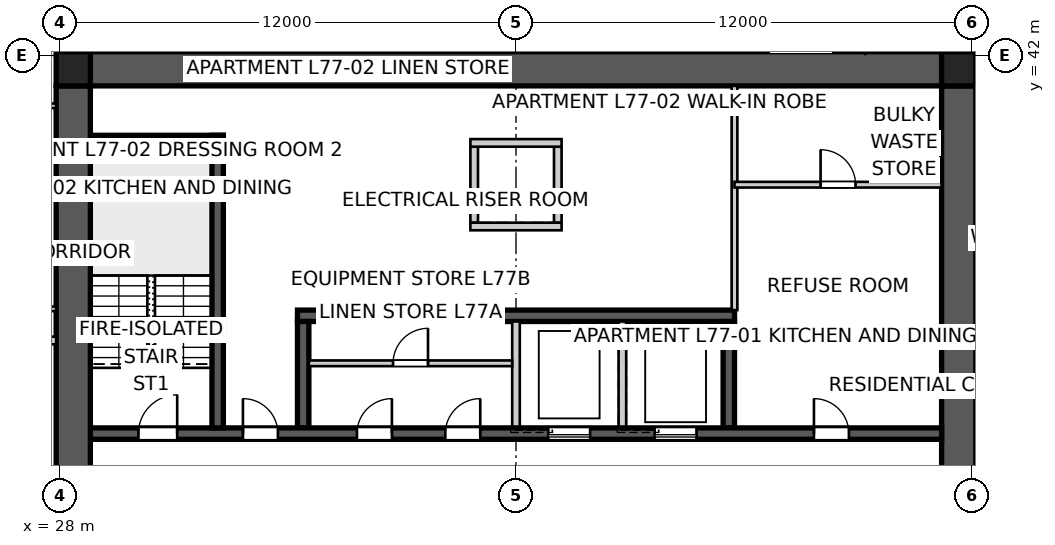
"""IFC4 building model, lengths in metres.
Left out: names, types, materials, properties, quantities, classifications, styles, units other than length and angle.
Written with IfcOpenShell. Run it as: python <this file> out.ifc"""

import sys

from ifc_helpers import new_model, si_unit, direction, frame, frame_2d, origin, origin_2d, place, context, subcontext, project, spatial, polyline, rectangle, outline, extrude, element, fill, save


model = new_model("IFC4")
c1 = context("Model", 3, precision=1e-05, world=origin(), true_north=direction((0.0, 1.0)))
c2 = subcontext(c1, "Body", "Model", "MODEL_VIEW")
j1 = project(units=[si_unit("LENGTHUNIT", "METRE"), si_unit("PLANEANGLEUNIT", "RADIAN")], contexts=[c1])
p1 = place(None, origin())
s1 = spatial("IfcSite", under=j1, at=p1, CompositionType="ELEMENT")
p2 = place(p1, origin())
s2 = spatial("IfcBuilding", under=s1, at=p2, CompositionType="ELEMENT")
p3 = place(p2, frame((0.0, 0.0, 279.4)))
s3 = spatial("IfcBuildingStorey", under=s2, at=p3, CompositionType="ELEMENT", Elevation=279.4)
p4 = place(p3, frame((28.8, 41.65, 0.0), z_axis=(0.0, 0.0, 1.0), x_axis=(1.0, 0.0, 0.0)))
e1 = element("IfcWall", 1, at=p4, inside=s3, PredefinedType="SHEAR", context=c2, shape_type="SweptSolid", body=[
    extrude(outline(polyline([(0.0, -0.45), (22.4, -0.45), (22.4, -0.025), (22.85, -0.025), (22.85, 0.025), (22.4, 0.025), (22.4, 0.45), (0.0, 0.45), (0.0, 0.025), (-0.45, 0.025), (-0.45, -0.025), (0.0, -0.025), (0.0, -0.45)])), origin(), (0.0, 0.0, 1.0), 3.4),
])
p5 = place(p3, frame((51.65, 18.8, 0.0), z_axis=(0.0, 0.0, 1.0), x_axis=(0.0, 1.0, 0.0)))
e2 = element("IfcWall", 2, at=p5, inside=s3, PredefinedType="SHEAR", context=c2, shape_type="SweptSolid", body=[
    extrude(outline(polyline([(0.0, -0.45), (22.4, -0.45), (22.4, -0.025), (22.85, -0.025), (22.85, 0.025), (22.4, 0.025), (22.4, 0.45), (0.0, 0.45), (0.0, 0.025), (-0.45, 0.025), (-0.45, -0.025), (0.0, -0.025), (0.0, -0.45)])), origin(), (0.0, 0.0, 1.0), 3.4),
])
p6 = place(p5, frame((11.14, 0.0, 0.0)))
e3 = element("IfcOpeningElement", 3, at=p6, cuts=e2, PredefinedType="OPENING", context=c2, shape_type="SweptSolid", body=[
    extrude(rectangle(XDim=1.02, YDim=2.4, at=frame_2d((0.51, 1.2))), frame((0.0, 0.46, 0.0), z_axis=(0.0, -1.0, 0.0), x_axis=(1.0, 0.0, 0.0)), (0.0, 0.0, 1.0), 0.92),
])
p7 = place(p3, frame((28.35, 41.2, 0.0), z_axis=(0.0, 0.0, 1.0), x_axis=(0.0, -1.0, 0.0)))
e4 = element("IfcWall", 4, at=p7, inside=s3, PredefinedType="SHEAR", context=c2, shape_type="SweptSolid", body=[
    extrude(outline(polyline([(0.0, -0.45), (22.4, -0.45), (22.4, -0.025), (22.85, -0.025), (22.85, 0.025), (22.4, 0.025), (22.4, 0.45), (0.0, 0.45), (0.0, 0.025), (-0.45, 0.025), (-0.45, -0.025), (0.0, -0.025), (0.0, -0.45)])), origin(), (0.0, 0.0, 1.0), 3.4),
])
p8 = place(p7, frame((11.14, 0.0, 0.0)))
e5 = element("IfcOpeningElement", 5, at=p8, cuts=e4, PredefinedType="OPENING", context=c2, shape_type="SweptSolid", body=[
    extrude(rectangle(XDim=1.02, YDim=2.4, at=frame_2d((0.51, 1.2))), frame((0.0, 0.46, 0.0), z_axis=(0.0, -1.0, 0.0), x_axis=(1.0, 0.0, 0.0)), (0.0, 0.0, 1.0), 0.92),
])
p9 = place(p3, frame((28.8, 32.05, 0.0), z_axis=(0.0, 0.0, 1.0), x_axis=(1.0, 0.0, 0.0)))
e6 = element("IfcWall", 6, at=p9, inside=s3, PredefinedType="SHEAR", context=c2, shape_type="SweptSolid", body=[
    extrude(rectangle(XDim=22.4, YDim=0.3, at=frame_2d((11.2, 0.0))), origin(), (0.0, 0.0, 1.0), 3.4),
])
p10 = place(p9, frame((19.04, 0.0, 0.0)))
e7 = element("IfcOpeningElement", 7, at=p10, cuts=e6, PredefinedType="OPENING", context=c2, shape_type="SweptSolid", body=[
    extrude(rectangle(XDim=0.92, YDim=2.1, at=frame_2d((0.46, 1.05))), frame((0.0, 0.16, 0.0), z_axis=(0.0, -1.0, 0.0), x_axis=(1.0, 0.0, 0.0)), (0.0, 0.0, 1.0), 0.32),
])
p11 = place(p9, frame((1.265, 0.0, 0.0)))
e8 = element("IfcOpeningElement", 8, at=p11, cuts=e6, PredefinedType="OPENING", context=c2, shape_type="SweptSolid", body=[
    extrude(rectangle(XDim=1.02, YDim=2.1, at=frame_2d((0.51, 1.05))), frame((0.0, 0.16, 0.0), z_axis=(0.0, -1.0, 0.0), x_axis=(1.0, 0.0, 0.0)), (0.0, 0.0, 1.0), 0.32),
])
p12 = place(p9, frame((4.015, 0.0, 0.0)))
e9 = element("IfcOpeningElement", 9, at=p12, cuts=e6, PredefinedType="OPENING", context=c2, shape_type="SweptSolid", body=[
    extrude(rectangle(XDim=0.92, YDim=2.1, at=frame_2d((0.46, 1.05))), frame((0.0, 0.16, 0.0), z_axis=(0.0, -1.0, 0.0), x_axis=(1.0, 0.0, 0.0)), (0.0, 0.0, 1.0), 0.32),
])
p13 = place(p9, frame((7.015, 0.0, 0.0)))
e10 = element("IfcOpeningElement", 10, at=p13, cuts=e6, PredefinedType="OPENING", context=c2, shape_type="SweptSolid", body=[
    extrude(rectangle(XDim=0.92, YDim=2.1, at=frame_2d((0.46, 1.05))), frame((0.0, 0.16, 0.0), z_axis=(0.0, -1.0, 0.0), x_axis=(1.0, 0.0, 0.0)), (0.0, 0.0, 1.0), 0.32),
])
p14 = place(p9, frame((9.34, 0.0, 0.0)))
e11 = element("IfcOpeningElement", 11, at=p14, cuts=e6, PredefinedType="OPENING", context=c2, shape_type="SweptSolid", body=[
    extrude(rectangle(XDim=0.92, YDim=2.1, at=frame_2d((0.46, 1.05))), frame((0.0, 0.16, 0.0), z_axis=(0.0, -1.0, 0.0), x_axis=(1.0, 0.0, 0.0)), (0.0, 0.0, 1.0), 0.32),
])
p15 = place(p9, frame((12.05, 0.0, 0.0)))
e12 = element("IfcOpeningElement", 12, at=p15, cuts=e6, PredefinedType="OPENING", context=c2, shape_type="SweptSolid", body=[
    extrude(rectangle(XDim=1.1, YDim=2.1, at=frame_2d((0.55, 1.05))), frame((0.0, 0.16, 0.0), z_axis=(0.0, -1.0, 0.0), x_axis=(1.0, 0.0, 0.0)), (0.0, 0.0, 1.0), 0.32),
])
p16 = place(p9, frame((14.85, 0.0, 0.0)))
e13 = element("IfcOpeningElement", 13, at=p16, cuts=e6, PredefinedType="OPENING", context=c2, shape_type="SweptSolid", body=[
    extrude(rectangle(XDim=1.1, YDim=2.1, at=frame_2d((0.55, 1.05))), frame((0.0, 0.16, 0.0), z_axis=(0.0, -1.0, 0.0), x_axis=(1.0, 0.0, 0.0)), (0.0, 0.0, 1.0), 0.32),
])
p17 = place(p3, frame((34.25, 35.15, 0.0), z_axis=(0.0, 0.0, 1.0), x_axis=(1.0, 0.0, 0.0)))
e14 = element("IfcWall", 14, at=p17, inside=s3, PredefinedType="SHEAR", context=c2, shape_type="SweptSolid", body=[
    extrude(rectangle(XDim=11.5, YDim=0.3, at=frame_2d((5.75, 0.0))), origin(), (0.0, 0.0, 1.0), 3.4),
])
p18 = place(p3, frame((34.4, 32.2, 0.0), z_axis=(0.0, 0.0, 1.0), x_axis=(0.0, 1.0, 0.0)))
e15 = element("IfcWall", 15, at=p18, inside=s3, PredefinedType="SHEAR", context=c2, shape_type="SweptSolid", body=[
    extrude(rectangle(XDim=2.8, YDim=0.3, at=frame_2d((1.4, 0.0))), origin(), (0.0, 0.0, 1.0), 3.4),
])
for number, where, z_axis, x_axis in (
    (16, (40.0, 32.2, 0.0), (0.0, 0.0, 1.0), (0.0, 1.0, 0.0)),
    (17, (42.8, 32.2, 0.0), (0.0, 0.0, 1.0), (0.0, 1.0, 0.0)),
):
    element("IfcWall", number, at=place(p3, frame(where, z_axis=z_axis, x_axis=x_axis)), inside=s3, PredefinedType="SOLIDWALL", context=c2, shape_type="SweptSolid", body=[
        extrude(rectangle(XDim=2.8, YDim=0.2, at=frame_2d((1.4, 0.0))), origin(), (0.0, 0.0, 1.0), 3.4),
    ])
p19 = place(p3, frame((45.6, 32.2, 0.0), z_axis=(0.0, 0.0, 1.0), x_axis=(0.0, 1.0, 0.0)))
e18 = element("IfcWall", 18, at=p19, inside=s3, PredefinedType="SHEAR", context=c2, shape_type="SweptSolid", body=[
    extrude(rectangle(XDim=2.8, YDim=0.3, at=frame_2d((1.4, 0.0))), origin(), (0.0, 0.0, 1.0), 3.4),
])
p20 = place(p3, frame((32.15, 32.2, 0.0), z_axis=(0.0, 0.0, 1.0), x_axis=(0.0, 1.0, 0.0)))
e19 = element("IfcWall", 19, at=p20, inside=s3, PredefinedType="SHEAR", context=c2, shape_type="SweptSolid", body=[
    extrude(rectangle(XDim=7.7, YDim=0.3, at=frame_2d((3.85, 0.0))), origin(), (0.0, 0.0, 1.0), 3.4),
])
p21 = place(p3, frame((28.8, 39.75, 0.0), z_axis=(0.0, 0.0, 1.0), x_axis=(1.0, 0.0, 0.0)))
e20 = element("IfcWall", 20, at=p21, inside=s3, PredefinedType="SHEAR", context=c2, shape_type="SweptSolid", body=[
    extrude(rectangle(XDim=3.5, YDim=0.3, at=frame_2d((1.75, 0.0))), origin(), (0.0, 0.0, 1.0), 3.4),
])
for number, where, z_axis, x_axis in (
    (21, (38.9, 37.6, 0.0), (0.0, 0.0, 1.0), (0.0, 1.0, 0.0)),
    (22, (41.1, 37.6, 0.0), (0.0, 0.0, 1.0), (0.0, 1.0, 0.0)),
):
    element("IfcWall", number, at=place(p3, frame(where, z_axis=z_axis, x_axis=x_axis)), inside=s3, PredefinedType="SOLIDWALL", context=c2, shape_type="SweptSolid", body=[
        extrude(rectangle(XDim=2.0, YDim=0.2, at=frame_2d((1.0, 0.0))), origin(), (0.0, 0.0, 1.0), 3.4),
    ])
for number, where, z_axis, x_axis in (
    (23, (38.8, 37.5, 0.0), (0.0, 0.0, 1.0), (1.0, 0.0, 0.0)),
    (24, (38.8, 39.7, 0.0), (0.0, 0.0, 1.0), (1.0, 0.0, 0.0)),
):
    element("IfcWall", number, at=place(p3, frame(where, z_axis=z_axis, x_axis=x_axis)), inside=s3, PredefinedType="SOLIDWALL", context=c2, shape_type="SweptSolid", body=[
        extrude(rectangle(XDim=2.4, YDim=0.2, at=frame_2d((1.2, 0.0))), origin(), (0.0, 0.0, 1.0), 3.4),
    ])
for number, where, z_axis, x_axis in (
    (25, (51.65, 41.65, 0.0), (0.0, 0.0, 1.0), (1.0, 0.0, 0.0)),
    (26, (28.35, 41.65, 0.0), (0.0, 0.0, 1.0), (1.0, 0.0, 0.0)),
):
    element("IfcColumn", number, at=place(p3, frame(where, z_axis=z_axis, x_axis=x_axis)), inside=s3, PredefinedType="COLUMN", context=c2, shape_type="SweptSolid", body=[
        extrude(rectangle(XDim=0.9, YDim=0.9, at=origin_2d()), origin(), (0.0, 0.0, 1.0), 3.4),
    ])
p22 = place(p3, frame((27.9, 34.5, 0.0), z_axis=(0.0, 0.0, 1.0), x_axis=(-1.0, 0.0, 0.0)))
e27 = element("IfcWall", 27, at=p22, inside=s3, PredefinedType="PARTITIONING", context=c2, shape_type="SweptSolid", body=[
    extrude(rectangle(XDim=2.5, YDim=0.2, at=frame_2d((1.25, 0.0))), origin(), (0.0, 0.0, 1.0), 3.25),
])
p23 = place(p3, frame((55.704, 43.177, 0.0), z_axis=(0.0, 0.0, 1.0), x_axis=(-0.76603440109, -0.64279957712, 0.0)))
e28 = element("IfcWall", 28, at=p23, inside=s3, PredefinedType="PARTITIONING", context=c2, shape_type="SweptSolid", body=[
    extrude(rectangle(XDim=4.64, YDim=0.25, at=frame_2d((2.32, 0.0))), origin(), (0.0, 0.0, 1.0), 3.25),
])
p24 = place(p3, frame((45.75, 41.2, 0.0), z_axis=(0.0, 0.0, 1.0), x_axis=(0.0, -1.0, 0.0)))
e29 = element("IfcWall", 29, at=p24, inside=s3, PredefinedType="SOLIDWALL", context=c2, shape_type="SweptSolid", body=[
    extrude(rectangle(XDim=5.9, YDim=0.15, at=frame_2d((2.95, 0.0))), origin(), (0.0, 0.0, 1.0), 3.25),
])
p25 = place(p3, frame((45.75, 38.6, 0.0), z_axis=(0.0, 0.0, 1.0), x_axis=(1.0, 0.0, 0.0)))
e30 = element("IfcWall", 30, at=p25, inside=s3, PredefinedType="SOLIDWALL", context=c2, shape_type="SweptSolid", body=[
    extrude(rectangle(XDim=5.45, YDim=0.15, at=frame_2d((2.725, 0.0))), origin(), (0.0, 0.0, 1.0), 3.25),
])
p26 = place(p25, frame((2.265, 0.0, 0.0)))
e31 = element("IfcOpeningElement", 31, at=p26, cuts=e30, PredefinedType="OPENING", context=c2, shape_type="SweptSolid", body=[
    extrude(rectangle(XDim=0.92, YDim=2.1, at=frame_2d((0.46, 1.05))), frame((0.0, 0.085, 0.0), z_axis=(0.0, -1.0, 0.0), x_axis=(1.0, 0.0, 0.0)), (0.0, 0.0, 1.0), 0.17),
])
p27 = place(p3, frame((23.0, 35.333, 0.0), z_axis=(0.0, 0.0, 1.0), x_axis=(1.0, 0.0, 0.0)))
e32 = element("IfcWall", 32, at=p27, inside=s3, PredefinedType="PARTITIONING", context=c2, shape_type="SweptSolid", body=[
    extrude(rectangle(XDim=4.9, YDim=0.12, at=frame_2d((2.45, 0.0))), origin(), (0.0, 0.0, 1.0), 3.25),
])
p28 = place(p27, frame((1.39, 0.0, 0.0)))
e33 = element("IfcOpeningElement", 33, at=p28, cuts=e32, PredefinedType="OPENING", context=c2, shape_type="SweptSolid", body=[
    extrude(rectangle(XDim=0.92, YDim=2.34, at=frame_2d((0.46, 1.17))), frame((0.0, 0.07, 0.0), z_axis=(0.0, -1.0, 0.0), x_axis=(1.0, 0.0, 0.0)), (0.0, 0.0, 1.0), 0.14),
])
p29 = place(p3, frame((23.0, 40.676, 0.0), z_axis=(0.0, 0.0, 1.0), x_axis=(1.0, 0.0, 0.0)))
e34 = element("IfcWall", 34, at=p29, inside=s3, PredefinedType="PARTITIONING", context=c2, shape_type="SweptSolid", body=[
    extrude(rectangle(XDim=4.9, YDim=0.12, at=frame_2d((2.45, 0.0))), origin(), (0.0, 0.0, 1.0), 3.25),
])
p30 = place(p29, frame((1.99, 0.0, 0.0)))
e35 = element("IfcOpeningElement", 35, at=p30, cuts=e34, PredefinedType="OPENING", context=c2, shape_type="SweptSolid", body=[
    extrude(rectangle(XDim=0.92, YDim=2.1, at=frame_2d((0.46, 1.05))), frame((0.0, 0.07, 0.0), z_axis=(0.0, -1.0, 0.0), x_axis=(1.0, 0.0, 0.0)), (0.0, 0.0, 1.0), 0.14),
])
p31 = place(p3, frame((28.663, 41.18, 0.0), z_axis=(0.0, 0.0, 1.0), x_axis=(0.0, 1.0, 0.0)))
e36 = element("IfcWall", 36, at=p31, inside=s3, PredefinedType="PARTITIONING", context=c2, shape_type="SweptSolid", body=[
    extrude(rectangle(XDim=5.82, YDim=0.12, at=frame_2d((2.91, 0.0))), origin(), (0.0, 0.0, 1.0), 3.25),
])
p32 = place(p31, frame((2.44, 0.0, 0.0)))
e37 = element("IfcOpeningElement", 37, at=p32, cuts=e36, PredefinedType="OPENING", context=c2, shape_type="SweptSolid", body=[
    extrude(rectangle(XDim=0.96, YDim=2.1, at=frame_2d((0.48, 1.05))), frame((0.0, 0.07, 0.0), z_axis=(0.0, -1.0, 0.0), x_axis=(1.0, 0.0, 0.0)), (0.0, 0.0, 1.0), 0.14),
])
p33 = place(p3, frame((49.136, 42.1, 0.0), z_axis=(0.0, 0.0, 1.0), x_axis=(0.766055078255, 0.642774935012, 0.0)))
e38 = element("IfcWall", 38, at=p33, inside=s3, PredefinedType="SOLIDWALL", context=c2, shape_type="SweptSolid", body=[
    extrude(rectangle(XDim=5.684, YDim=0.15, at=frame_2d((2.842, 0.0))), origin(), (0.0, 0.0, 1.0), 3.25),
])
p34 = place(p33, frame((2.402, 0.0, 0.0)))
e39 = element("IfcOpeningElement", 39, at=p34, cuts=e38, PredefinedType="OPENING", context=c2, shape_type="SweptSolid", body=[
    extrude(rectangle(XDim=0.92, YDim=2.1, at=frame_2d((0.46, 1.05))), frame((0.0, 0.085, 0.0), z_axis=(0.0, -1.0, 0.0), x_axis=(1.0, 0.0, 0.0)), (0.0, 0.0, 1.0), 0.17),
])
p35 = place(p3, frame((34.55, 33.9, 0.0), z_axis=(0.0, 0.0, 1.0), x_axis=(1.0, 0.0, 0.0)))
e40 = element("IfcWall", 40, at=p35, inside=s3, PredefinedType="SOLIDWALL", context=c2, shape_type="SweptSolid", body=[
    extrude(rectangle(XDim=5.35, YDim=0.15, at=frame_2d((2.675, 0.0))), origin(), (0.0, 0.0, 1.0), 3.25),
])
p36 = place(p35, frame((2.215, 0.0, 0.0)))
e41 = element("IfcOpeningElement", 41, at=p36, cuts=e40, PredefinedType="OPENING", context=c2, shape_type="SweptSolid", body=[
    extrude(rectangle(XDim=0.92, YDim=2.1, at=frame_2d((0.46, 1.05))), frame((0.0, 0.085, 0.0), z_axis=(0.0, -1.0, 0.0), x_axis=(1.0, 0.0, 0.0)), (0.0, 0.0, 1.0), 0.17),
])
p37 = place(p10, origin())
e42 = element("IfcDoor", 42, at=p37, inside=s3, OperationType="SINGLE_SWING_LEFT", PredefinedType="DOOR", context=c2, shape_type="SweptSolid", body=[
    extrude(rectangle(XDim=0.92, YDim=2.1, at=frame_2d((0.46, 1.05))), frame((0.0, 0.025, 0.0), z_axis=(0.0, -1.0, 0.0), x_axis=(1.0, 0.0, 0.0)), (0.0, 0.0, 1.0), 0.05),
])
fill(e7, e42)
p38 = place(p11, origin())
e43 = element("IfcDoor", 43, at=p38, inside=s3, OperationType="SINGLE_SWING_RIGHT", PredefinedType="DOOR", context=c2, shape_type="SweptSolid", body=[
    extrude(rectangle(XDim=1.02, YDim=2.1, at=frame_2d((0.51, 1.05))), frame((0.0, 0.025, 0.0), z_axis=(0.0, -1.0, 0.0), x_axis=(1.0, 0.0, 0.0)), (0.0, 0.0, 1.0), 0.05),
])
fill(e8, e43)
p39 = place(p12, origin())
e44 = element("IfcDoor", 44, at=p39, inside=s3, OperationType="SINGLE_SWING_LEFT", PredefinedType="DOOR", context=c2, shape_type="SweptSolid", body=[
    extrude(rectangle(XDim=0.92, YDim=2.1, at=frame_2d((0.46, 1.05))), frame((0.0, 0.025, 0.0), z_axis=(0.0, -1.0, 0.0), x_axis=(1.0, 0.0, 0.0)), (0.0, 0.0, 1.0), 0.05),
])
fill(e9, e44)
p40 = place(p26, origin())
e45 = element("IfcDoor", 45, at=p40, inside=s3, OperationType="SINGLE_SWING_LEFT", PredefinedType="DOOR", context=c2, shape_type="SweptSolid", body=[
    extrude(rectangle(XDim=0.92, YDim=2.1, at=frame_2d((0.46, 1.05))), frame((0.0, 0.025, 0.0), z_axis=(0.0, -1.0, 0.0), x_axis=(1.0, 0.0, 0.0)), (0.0, 0.0, 1.0), 0.05),
])
fill(e31, e45)
p41 = place(p13, origin())
e46 = element("IfcDoor", 46, at=p41, inside=s3, OperationType="SINGLE_SWING_RIGHT", PredefinedType="DOOR", context=c2, shape_type="SweptSolid", body=[
    extrude(rectangle(XDim=0.92, YDim=2.1, at=frame_2d((0.46, 1.05))), frame((0.0, 0.025, 0.0), z_axis=(0.0, -1.0, 0.0), x_axis=(1.0, 0.0, 0.0)), (0.0, 0.0, 1.0), 0.05),
])
fill(e10, e46)
p42 = place(p14, origin())
e47 = element("IfcDoor", 47, at=p42, inside=s3, OperationType="SINGLE_SWING_RIGHT", PredefinedType="DOOR", context=c2, shape_type="SweptSolid", body=[
    extrude(rectangle(XDim=0.92, YDim=2.1, at=frame_2d((0.46, 1.05))), frame((0.0, 0.025, 0.0), z_axis=(0.0, -1.0, 0.0), x_axis=(1.0, 0.0, 0.0)), (0.0, 0.0, 1.0), 0.05),
])
fill(e11, e47)
p43 = place(p36, origin())
e48 = element("IfcDoor", 48, at=p43, inside=s3, OperationType="SINGLE_SWING_RIGHT", PredefinedType="DOOR", context=c2, shape_type="SweptSolid", body=[
    extrude(rectangle(XDim=0.92, YDim=2.1, at=frame_2d((0.46, 1.05))), frame((0.0, 0.025, 0.0), z_axis=(0.0, -1.0, 0.0), x_axis=(1.0, 0.0, 0.0)), (0.0, 0.0, 1.0), 0.05),
])
fill(e41, e48)
p44 = place(p15, origin())
e49 = element("IfcDoor", 49, at=p44, inside=s3, OperationType="SLIDING_TO_LEFT", PredefinedType="DOOR", context=c2, shape_type="SweptSolid", body=[
    extrude(rectangle(XDim=1.1, YDim=2.1, at=frame_2d((0.55, 1.05))), frame((0.0, 0.025, 0.0), z_axis=(0.0, -1.0, 0.0), x_axis=(1.0, 0.0, 0.0)), (0.0, 0.0, 1.0), 0.05),
])
fill(e12, e49)
p45 = place(p16, origin())
e50 = element("IfcDoor", 50, at=p45, inside=s3, OperationType="SLIDING_TO_LEFT", PredefinedType="DOOR", context=c2, shape_type="SweptSolid", body=[
    extrude(rectangle(XDim=1.1, YDim=2.1, at=frame_2d((0.55, 1.05))), frame((0.0, 0.025, 0.0), z_axis=(0.0, -1.0, 0.0), x_axis=(1.0, 0.0, 0.0)), (0.0, 0.0, 1.0), 0.05),
])
fill(e13, e50)
save(model, sys.argv[1])
